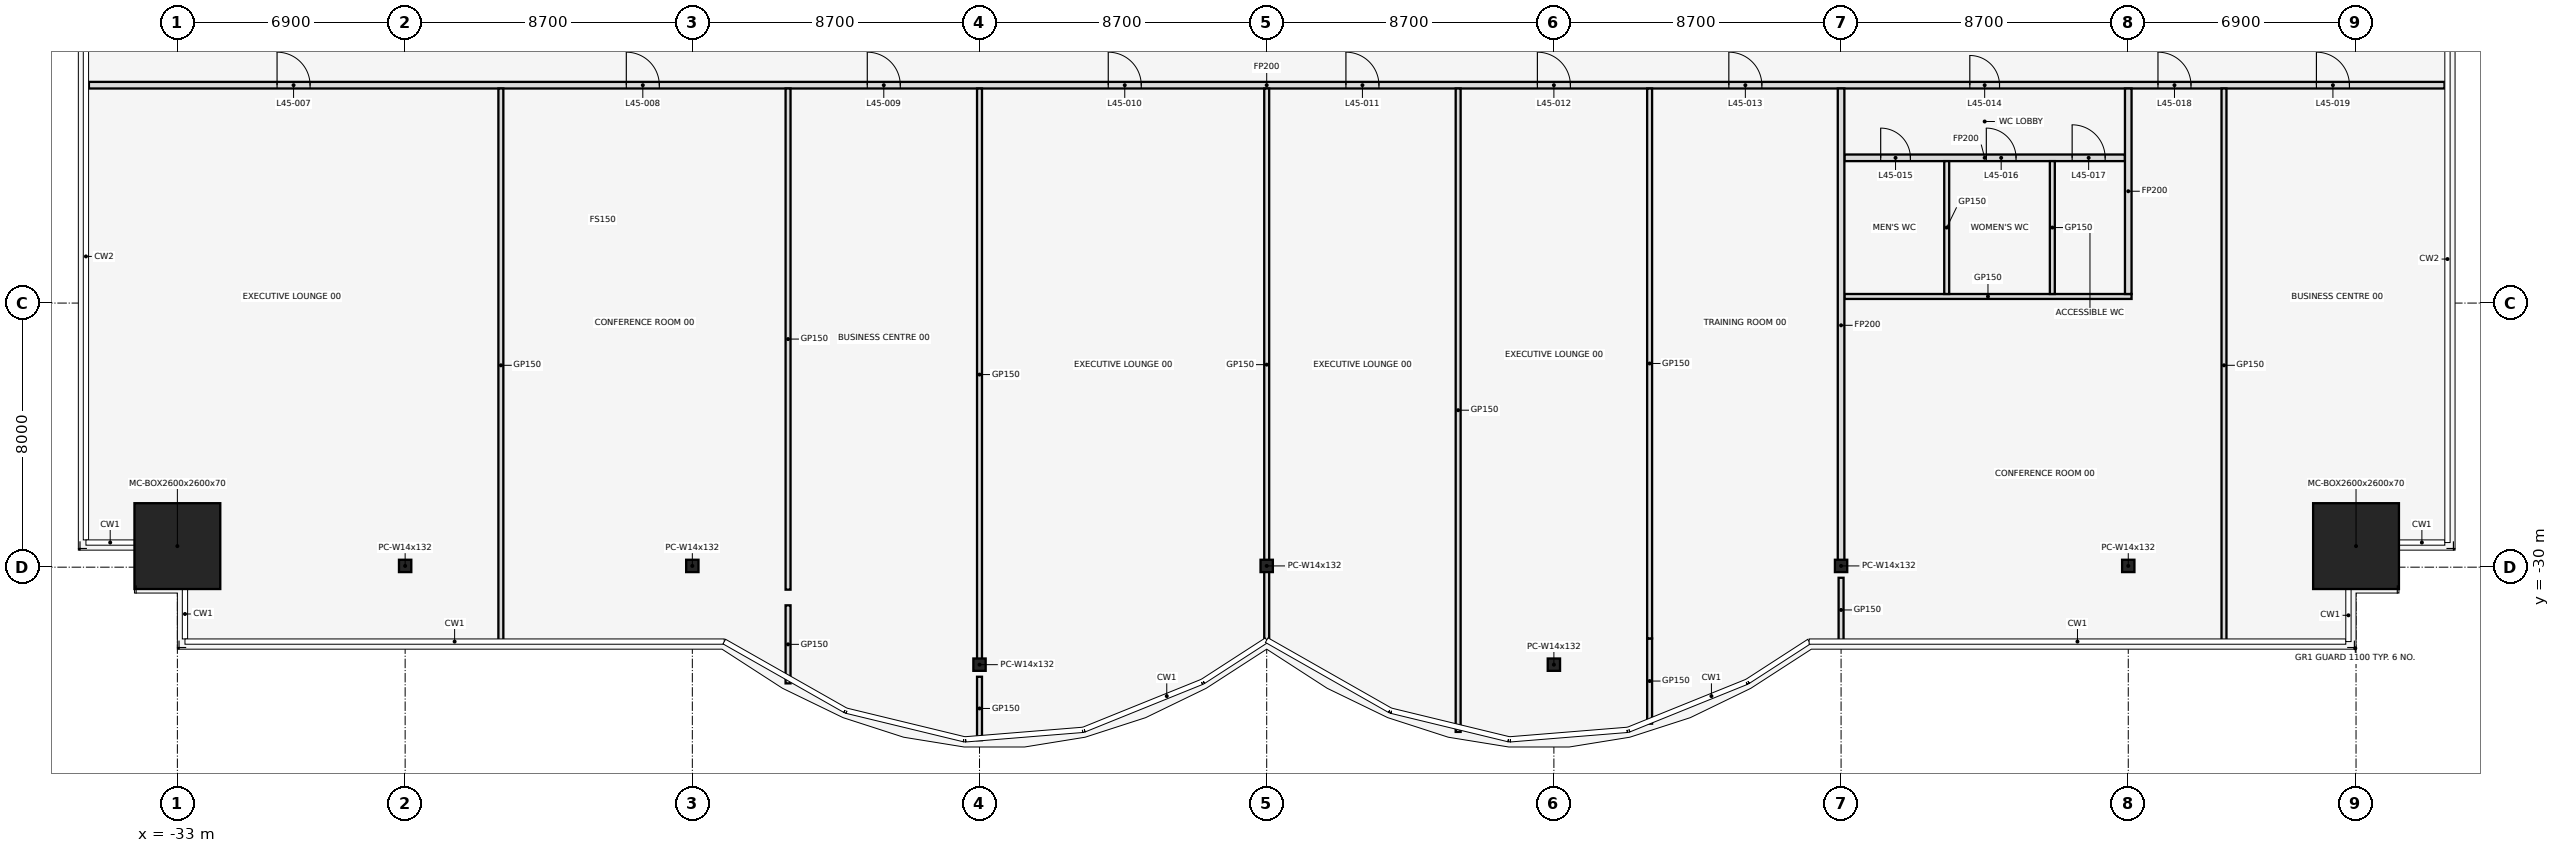
"""IFC4 building model, lengths in metres.
Left out: names, types, materials, properties, quantities, classifications, styles, units other than length and angle.
Written with IfcOpenShell. Run it as: python <this file> out.ifc"""

import sys

from ifc_helpers import new_model, si_unit, direction, frame, frame_2d, origin, origin_2d, place, context, subcontext, project, spatial, rectangle, hollow_rectangle, i_section, extrude, element, fill, save


model = new_model("IFC4")
c1 = context("Model", 3, precision=1e-05, world=origin(), true_north=direction((0.0, 1.0)))
c2 = subcontext(c1, "Body", "Model", "MODEL_VIEW")
j1 = project(units=[si_unit("LENGTHUNIT", "METRE"), si_unit("PLANEANGLEUNIT", "RADIAN")], contexts=[c1])
p1 = place(None, origin())
s1 = spatial("IfcSite", under=j1, at=p1, CompositionType="ELEMENT")
p2 = place(p1, origin())
s2 = spatial("IfcBuilding", under=s1, at=p2, CompositionType="ELEMENT")
p3 = place(p2, frame((0.0, 0.0, 203.2)))
s3 = spatial("IfcBuildingStorey", under=s2, at=p3, CompositionType="ELEMENT", Elevation=203.2)
p4 = place(p3, frame((-33.0, -29.362, 0.0), z_axis=(0.0, 0.0, 1.0), x_axis=(1.0, 0.0, 0.0)))
e1 = element("IfcColumn", 1, at=p4, inside=s3, PredefinedType="COLUMN", context=c2, shape_type="SweptSolid", body=[
    extrude(hollow_rectangle(XDim=2.6, YDim=2.6, WallThickness=0.07, at=origin_2d()), origin(), (0.0, 0.0, 1.0), 4.1),
])
for number, where, z_axis, x_axis in (
    (2, (-26.1, -29.962, 0.0), (0.0, 0.0, 1.0), (1.0, 0.0, 0.0)),
    (3, (-17.4, -29.962, 0.0), (0.0, 0.0, 1.0), (1.0, 0.0, 0.0)),
    (4, (-8.7, -32.953, 0.0), (0.0, 0.0, 1.0), (1.0, 0.0, 0.0)),
    (5, (0.0, -29.962, 0.0), (0.0, 0.0, 1.0), (1.0, 0.0, 0.0)),
    (6, (8.7, -32.953, 0.0), (0.0, 0.0, 1.0), (1.0, 0.0, 0.0)),
    (7, (17.4, -29.962, 0.0), (0.0, 0.0, 1.0), (1.0, 0.0, 0.0)),
    (8, (26.1, -29.962, 0.0), (0.0, 0.0, 1.0), (1.0, 0.0, 0.0)),
):
    element("IfcColumn", number, at=place(p3, frame(where, z_axis=z_axis, x_axis=x_axis)), inside=s3, PredefinedType="COLUMN", context=c2, shape_type="SweptSolid", body=[
        extrude(i_section(OverallWidth=0.373, OverallDepth=0.373, WebThickness=0.016, FlangeThickness=0.026, at=origin_2d()), origin(), (0.0, 0.0, 1.0), 4.1),
    ])
p5 = place(p3, frame((33.0, -29.362, 0.0), z_axis=(0.0, 0.0, 1.0), x_axis=(1.0, 0.0, 0.0)))
e9 = element("IfcColumn", 9, at=p5, inside=s3, PredefinedType="COLUMN", context=c2, shape_type="SweptSolid", body=[
    extrude(hollow_rectangle(XDim=2.6, YDim=2.6, WallThickness=0.07, at=origin_2d()), origin(), (0.0, 0.0, 1.0), 4.1),
])
p6 = place(p3, frame((17.5, -21.8, 0.0), z_axis=(0.0, 0.0, 1.0), x_axis=(1.0, 0.0, 0.0)))
e10 = element("IfcWall", 10, at=p6, inside=s3, PredefinedType="PARTITIONING", context=c2, shape_type="SweptSolid", body=[
    extrude(rectangle(XDim=8.7, YDim=0.15, at=frame_2d((4.35, 0.0))), origin(), (0.0, 0.0, 1.0), 2.84),
])
p7 = place(p3, frame((17.5, -17.6, 0.0), z_axis=(0.0, 0.0, 1.0), x_axis=(1.0, 0.0, 0.0)))
e11 = element("IfcWall", 11, at=p7, inside=s3, PredefinedType="PARTITIONING", context=c2, shape_type="SweptSolid", body=[
    extrude(rectangle(XDim=8.5, YDim=0.2, at=frame_2d((4.25, 0.0))), origin(), (0.0, 0.0, 1.0), 2.84),
])
p8 = place(p7, frame((1.1, 0.0, 0.0)))
e12 = element("IfcOpeningElement", 12, at=p8, cuts=e11, PredefinedType="OPENING", context=c2, shape_type="SweptSolid", body=[
    extrude(rectangle(XDim=0.9, YDim=2.1, at=frame_2d((0.45, 1.05))), frame((0.0, 0.112, 0.0), z_axis=(0.0, -1.0, 0.0), x_axis=(1.0, 0.0, 0.0)), (0.0, 0.0, 1.0), 0.224),
])
p9 = place(p7, frame((4.3, 0.0, 0.0)))
e13 = element("IfcOpeningElement", 13, at=p9, cuts=e11, PredefinedType="OPENING", context=c2, shape_type="SweptSolid", body=[
    extrude(rectangle(XDim=0.9, YDim=2.1, at=frame_2d((0.45, 1.05))), frame((0.0, 0.112, 0.0), z_axis=(0.0, -1.0, 0.0), x_axis=(1.0, 0.0, 0.0)), (0.0, 0.0, 1.0), 0.224),
])
p10 = place(p7, frame((6.9, 0.0, 0.0)))
e14 = element("IfcOpeningElement", 14, at=p10, cuts=e11, PredefinedType="OPENING", context=c2, shape_type="SweptSolid", body=[
    extrude(rectangle(XDim=1.0, YDim=2.1, at=frame_2d((0.5, 1.05))), frame((0.0, 0.112, 0.0), z_axis=(0.0, -1.0, 0.0), x_axis=(1.0, 0.0, 0.0)), (0.0, 0.0, 1.0), 0.224),
])
p11 = place(p3, frame((-35.68, -15.4, 0.0), z_axis=(0.0, 0.0, 1.0), x_axis=(1.0, 0.0, 0.0)))
e15 = element("IfcWall", 15, at=p11, inside=s3, PredefinedType="PARTITIONING", context=c2, shape_type="SweptSolid", body=[
    extrude(rectangle(XDim=71.36, YDim=0.2, at=frame_2d((35.68, 0.0))), origin(), (0.0, 0.0, 1.0), 2.84),
])
p12 = place(p11, frame((5.7, 0.0, 0.0)))
e16 = element("IfcOpeningElement", 16, at=p12, cuts=e15, PredefinedType="OPENING", context=c2, shape_type="SweptSolid", body=[
    extrude(rectangle(XDim=1.0, YDim=2.1, at=frame_2d((0.5, 1.05))), frame((0.0, 0.112, 0.0), z_axis=(0.0, -1.0, 0.0), x_axis=(1.0, 0.0, 0.0)), (0.0, 0.0, 1.0), 0.224),
])
p13 = place(p11, frame((16.28, 0.0, 0.0)))
e17 = element("IfcOpeningElement", 17, at=p13, cuts=e15, PredefinedType="OPENING", context=c2, shape_type="SweptSolid", body=[
    extrude(rectangle(XDim=1.0, YDim=2.1, at=frame_2d((0.5, 1.05))), frame((0.0, 0.112, 0.0), z_axis=(0.0, -1.0, 0.0), x_axis=(1.0, 0.0, 0.0)), (0.0, 0.0, 1.0), 0.224),
])
p14 = place(p11, frame((23.58, 0.0, 0.0)))
e18 = element("IfcOpeningElement", 18, at=p14, cuts=e15, PredefinedType="OPENING", context=c2, shape_type="SweptSolid", body=[
    extrude(rectangle(XDim=1.0, YDim=2.1, at=frame_2d((0.5, 1.05))), frame((0.0, 0.112, 0.0), z_axis=(0.0, -1.0, 0.0), x_axis=(1.0, 0.0, 0.0)), (0.0, 0.0, 1.0), 0.224),
])
p15 = place(p11, frame((30.88, 0.0, 0.0)))
e19 = element("IfcOpeningElement", 19, at=p15, cuts=e15, PredefinedType="OPENING", context=c2, shape_type="SweptSolid", body=[
    extrude(rectangle(XDim=1.0, YDim=2.1, at=frame_2d((0.5, 1.05))), frame((0.0, 0.112, 0.0), z_axis=(0.0, -1.0, 0.0), x_axis=(1.0, 0.0, 0.0)), (0.0, 0.0, 1.0), 0.224),
])
p16 = place(p11, frame((38.08, 0.0, 0.0)))
e20 = element("IfcOpeningElement", 20, at=p16, cuts=e15, PredefinedType="OPENING", context=c2, shape_type="SweptSolid", body=[
    extrude(rectangle(XDim=1.0, YDim=2.1, at=frame_2d((0.5, 1.05))), frame((0.0, 0.112, 0.0), z_axis=(0.0, -1.0, 0.0), x_axis=(1.0, 0.0, 0.0)), (0.0, 0.0, 1.0), 0.224),
])
p17 = place(p11, frame((43.88, 0.0, 0.0)))
e21 = element("IfcOpeningElement", 21, at=p17, cuts=e15, PredefinedType="OPENING", context=c2, shape_type="SweptSolid", body=[
    extrude(rectangle(XDim=1.0, YDim=2.1, at=frame_2d((0.5, 1.05))), frame((0.0, 0.112, 0.0), z_axis=(0.0, -1.0, 0.0), x_axis=(1.0, 0.0, 0.0)), (0.0, 0.0, 1.0), 0.224),
])
p18 = place(p11, frame((49.68, 0.0, 0.0)))
e22 = element("IfcOpeningElement", 22, at=p18, cuts=e15, PredefinedType="OPENING", context=c2, shape_type="SweptSolid", body=[
    extrude(rectangle(XDim=1.0, YDim=2.1, at=frame_2d((0.5, 1.05))), frame((0.0, 0.112, 0.0), z_axis=(0.0, -1.0, 0.0), x_axis=(1.0, 0.0, 0.0)), (0.0, 0.0, 1.0), 0.224),
])
p19 = place(p11, frame((56.98, 0.0, 0.0)))
e23 = element("IfcOpeningElement", 23, at=p19, cuts=e15, PredefinedType="OPENING", context=c2, shape_type="SweptSolid", body=[
    extrude(rectangle(XDim=0.9, YDim=2.1, at=frame_2d((0.45, 1.05))), frame((0.0, 0.112, 0.0), z_axis=(0.0, -1.0, 0.0), x_axis=(1.0, 0.0, 0.0)), (0.0, 0.0, 1.0), 0.224),
])
p20 = place(p11, frame((62.68, 0.0, 0.0)))
e24 = element("IfcOpeningElement", 24, at=p20, cuts=e15, PredefinedType="OPENING", context=c2, shape_type="SweptSolid", body=[
    extrude(rectangle(XDim=1.0, YDim=2.1, at=frame_2d((0.5, 1.05))), frame((0.0, 0.112, 0.0), z_axis=(0.0, -1.0, 0.0), x_axis=(1.0, 0.0, 0.0)), (0.0, 0.0, 1.0), 0.224),
])
p21 = place(p11, frame((67.48, 0.0, 0.0)))
e25 = element("IfcOpeningElement", 25, at=p21, cuts=e15, PredefinedType="OPENING", context=c2, shape_type="SweptSolid", body=[
    extrude(rectangle(XDim=1.0, YDim=2.1, at=frame_2d((0.5, 1.05))), frame((0.0, 0.112, 0.0), z_axis=(0.0, -1.0, 0.0), x_axis=(1.0, 0.0, 0.0)), (0.0, 0.0, 1.0), 0.224),
])
p22 = place(p3, frame((-23.2, -32.27, 0.0), z_axis=(0.0, 0.0, 1.0), x_axis=(0.0, 1.0, 0.0)))
e26 = element("IfcWall", 26, at=p22, inside=s3, PredefinedType="PARTITIONING", context=c2, shape_type="SweptSolid", body=[
    extrude(rectangle(XDim=16.77, YDim=0.15, at=frame_2d((8.385, 0.0))), origin(), (0.0, 0.0, 1.0), 2.84),
])
p23 = place(p3, frame((-14.5, -33.52, 0.0), z_axis=(0.0, 0.0, 1.0), x_axis=(0.0, 1.0, 0.0)))
e27 = element("IfcWall", 27, at=p23, inside=s3, PredefinedType="PARTITIONING", context=c2, shape_type="SweptSolid", body=[
    extrude(rectangle(XDim=2.365, YDim=0.15, at=frame_2d((1.182, 0.0))), origin(), (0.0, 0.0, 1.0), 2.84),
])
p24 = place(p3, frame((-14.5, -30.681, 0.0), z_axis=(0.0, 0.0, 1.0), x_axis=(0.0, 1.0, 0.0)))
e28 = element("IfcWall", 28, at=p24, inside=s3, PredefinedType="PARTITIONING", context=c2, shape_type="SweptSolid", body=[
    extrude(rectangle(XDim=15.181, YDim=0.15, at=frame_2d((7.59, 0.0))), origin(), (0.0, 0.0, 1.0), 2.84),
])
p25 = place(p3, frame((-8.7, -35.24, 0.0), z_axis=(0.0, 0.0, 1.0), x_axis=(0.0, 1.0, 0.0)))
e29 = element("IfcWall", 29, at=p25, inside=s3, PredefinedType="PARTITIONING", context=c2, shape_type="SweptSolid", body=[
    extrude(rectangle(XDim=1.921, YDim=0.15, at=frame_2d((0.96, 0.0))), origin(), (0.0, 0.0, 1.0), 2.84),
])
p26 = place(p3, frame((-8.7, -32.831, 0.0), z_axis=(0.0, 0.0, 1.0), x_axis=(0.0, 1.0, 0.0)))
e30 = element("IfcWall", 30, at=p26, inside=s3, PredefinedType="PARTITIONING", context=c2, shape_type="SweptSolid", body=[
    extrude(rectangle(XDim=17.331, YDim=0.15, at=frame_2d((8.666, 0.0))), origin(), (0.0, 0.0, 1.0), 2.84),
])
p27 = place(p3, frame((0.0, -32.23, 0.0), z_axis=(0.0, 0.0, 1.0), x_axis=(0.0, 1.0, 0.0)))
e31 = element("IfcWall", 31, at=p27, inside=s3, PredefinedType="PARTITIONING", context=c2, shape_type="SweptSolid", body=[
    extrude(rectangle(XDim=16.73, YDim=0.15, at=frame_2d((8.365, 0.0))), origin(), (0.0, 0.0, 1.0), 2.84),
])
p28 = place(p3, frame((5.8, -34.99, 0.0), z_axis=(0.0, 0.0, 1.0), x_axis=(0.0, 1.0, 0.0)))
e32 = element("IfcWall", 32, at=p28, inside=s3, PredefinedType="PARTITIONING", context=c2, shape_type="SweptSolid", body=[
    extrude(rectangle(XDim=19.49, YDim=0.15, at=frame_2d((9.745, 0.0))), origin(), (0.0, 0.0, 1.0), 2.84),
])
p29 = place(p3, frame((11.6, -34.74, 0.0), z_axis=(0.0, 0.0, 1.0), x_axis=(0.0, 1.0, 0.0)))
e33 = element("IfcWall", 33, at=p29, inside=s3, PredefinedType="PARTITIONING", context=c2, shape_type="SweptSolid", body=[
    extrude(rectangle(XDim=2.581, YDim=0.15, at=frame_2d((1.291, 0.0))), origin(), (0.0, 0.0, 1.0), 2.84),
])
p30 = place(p3, frame((11.6, -32.159, 0.0), z_axis=(0.0, 0.0, 1.0), x_axis=(0.0, 1.0, 0.0)))
e34 = element("IfcWall", 34, at=p30, inside=s3, PredefinedType="PARTITIONING", context=c2, shape_type="SweptSolid", body=[
    extrude(rectangle(XDim=16.659, YDim=0.15, at=frame_2d((8.33, 0.0))), origin(), (0.0, 0.0, 1.0), 2.84),
])
p31 = place(p3, frame((17.4, -32.27, 0.0), z_axis=(0.0, 0.0, 1.0), x_axis=(0.0, 1.0, 0.0)))
e35 = element("IfcWall", 35, at=p31, inside=s3, PredefinedType="PARTITIONING", context=c2, shape_type="SweptSolid", body=[
    extrude(rectangle(XDim=1.949, YDim=0.15, at=frame_2d((0.974, 0.0))), origin(), (0.0, 0.0, 1.0), 2.84),
])
p32 = place(p3, frame((17.4, -29.847, 0.0), z_axis=(0.0, 0.0, 1.0), x_axis=(0.0, 1.0, 0.0)))
e36 = element("IfcWall", 36, at=p32, inside=s3, PredefinedType="PARTITIONING", context=c2, shape_type="SweptSolid", body=[
    extrude(rectangle(XDim=14.347, YDim=0.2, at=frame_2d((7.173, 0.0))), origin(), (0.0, 0.0, 1.0), 2.84),
])
for number, where, z_axis, x_axis in (
    (37, (20.6, -21.725, 0.0), (0.0, 0.0, 1.0), (0.0, 1.0, 0.0)),
    (38, (23.8, -21.725, 0.0), (0.0, 0.0, 1.0), (0.0, 1.0, 0.0)),
):
    element("IfcWall", number, at=place(p3, frame(where, z_axis=z_axis, x_axis=x_axis)), inside=s3, PredefinedType="PARTITIONING", context=c2, shape_type="SweptSolid", body=[
        extrude(rectangle(XDim=4.025, YDim=0.15, at=frame_2d((2.013, 0.0))), origin(), (0.0, 0.0, 1.0), 2.84),
    ])
p33 = place(p3, frame((26.1, -21.725, 0.0), z_axis=(0.0, 0.0, 1.0), x_axis=(0.0, 1.0, 0.0)))
e39 = element("IfcWall", 39, at=p33, inside=s3, PredefinedType="PARTITIONING", context=c2, shape_type="SweptSolid", body=[
    extrude(rectangle(XDim=6.225, YDim=0.2, at=frame_2d((3.113, 0.0))), origin(), (0.0, 0.0, 1.0), 2.84),
])
p34 = place(p3, frame((29.0, -32.27, 0.0), z_axis=(0.0, 0.0, 1.0), x_axis=(0.0, 1.0, 0.0)))
e40 = element("IfcWall", 40, at=p34, inside=s3, PredefinedType="PARTITIONING", context=c2, shape_type="SweptSolid", body=[
    extrude(rectangle(XDim=16.77, YDim=0.15, at=frame_2d((8.385, 0.0))), origin(), (0.0, 0.0, 1.0), 2.84),
])
p35 = place(p12, frame((1.0, 0.0, 0.0), z_axis=(0.0, 0.0, 1.0), x_axis=(-1.0, 0.0, 0.0)))
e41 = element("IfcDoor", 41, at=p35, inside=s3, OperationType="SINGLE_SWING_LEFT", PredefinedType="DOOR", context=c2, shape_type="SweptSolid", body=[
    extrude(rectangle(XDim=1.0, YDim=2.1, at=frame_2d((0.5, 1.05))), frame((0.0, 0.025, 0.0), z_axis=(0.0, -1.0, 0.0), x_axis=(1.0, 0.0, 0.0)), (0.0, 0.0, 1.0), 0.05),
])
fill(e16, e41)
p36 = place(p13, frame((1.0, 0.0, 0.0), z_axis=(0.0, 0.0, 1.0), x_axis=(-1.0, 0.0, 0.0)))
e42 = element("IfcDoor", 42, at=p36, inside=s3, OperationType="SINGLE_SWING_RIGHT", PredefinedType="DOOR", context=c2, shape_type="SweptSolid", body=[
    extrude(rectangle(XDim=1.0, YDim=2.1, at=frame_2d((0.5, 1.05))), frame((0.0, 0.025, 0.0), z_axis=(0.0, -1.0, 0.0), x_axis=(1.0, 0.0, 0.0)), (0.0, 0.0, 1.0), 0.05),
])
fill(e17, e42)
p37 = place(p14, frame((1.0, 0.0, 0.0), z_axis=(0.0, 0.0, 1.0), x_axis=(-1.0, 0.0, 0.0)))
e43 = element("IfcDoor", 43, at=p37, inside=s3, OperationType="SINGLE_SWING_RIGHT", PredefinedType="DOOR", context=c2, shape_type="SweptSolid", body=[
    extrude(rectangle(XDim=1.0, YDim=2.1, at=frame_2d((0.5, 1.05))), frame((0.0, 0.025, 0.0), z_axis=(0.0, -1.0, 0.0), x_axis=(1.0, 0.0, 0.0)), (0.0, 0.0, 1.0), 0.05),
])
fill(e18, e43)
p38 = place(p15, frame((1.0, 0.0, 0.0), z_axis=(0.0, 0.0, 1.0), x_axis=(-1.0, 0.0, 0.0)))
e44 = element("IfcDoor", 44, at=p38, inside=s3, OperationType="SINGLE_SWING_LEFT", PredefinedType="DOOR", context=c2, shape_type="SweptSolid", body=[
    extrude(rectangle(XDim=1.0, YDim=2.1, at=frame_2d((0.5, 1.05))), frame((0.0, 0.025, 0.0), z_axis=(0.0, -1.0, 0.0), x_axis=(1.0, 0.0, 0.0)), (0.0, 0.0, 1.0), 0.05),
])
fill(e19, e44)
p39 = place(p16, frame((1.0, 0.0, 0.0), z_axis=(0.0, 0.0, 1.0), x_axis=(-1.0, 0.0, 0.0)))
e45 = element("IfcDoor", 45, at=p39, inside=s3, OperationType="SINGLE_SWING_RIGHT", PredefinedType="DOOR", context=c2, shape_type="SweptSolid", body=[
    extrude(rectangle(XDim=1.0, YDim=2.1, at=frame_2d((0.5, 1.05))), frame((0.0, 0.025, 0.0), z_axis=(0.0, -1.0, 0.0), x_axis=(1.0, 0.0, 0.0)), (0.0, 0.0, 1.0), 0.05),
])
fill(e20, e45)
p40 = place(p17, frame((1.0, 0.0, 0.0), z_axis=(0.0, 0.0, 1.0), x_axis=(-1.0, 0.0, 0.0)))
e46 = element("IfcDoor", 46, at=p40, inside=s3, OperationType="SINGLE_SWING_RIGHT", PredefinedType="DOOR", context=c2, shape_type="SweptSolid", body=[
    extrude(rectangle(XDim=1.0, YDim=2.1, at=frame_2d((0.5, 1.05))), frame((0.0, 0.025, 0.0), z_axis=(0.0, -1.0, 0.0), x_axis=(1.0, 0.0, 0.0)), (0.0, 0.0, 1.0), 0.05),
])
fill(e21, e46)
p41 = place(p18, frame((1.0, 0.0, 0.0), z_axis=(0.0, 0.0, 1.0), x_axis=(-1.0, 0.0, 0.0)))
e47 = element("IfcDoor", 47, at=p41, inside=s3, OperationType="SINGLE_SWING_LEFT", PredefinedType="DOOR", context=c2, shape_type="SweptSolid", body=[
    extrude(rectangle(XDim=1.0, YDim=2.1, at=frame_2d((0.5, 1.05))), frame((0.0, 0.025, 0.0), z_axis=(0.0, -1.0, 0.0), x_axis=(1.0, 0.0, 0.0)), (0.0, 0.0, 1.0), 0.05),
])
fill(e22, e47)
p42 = place(p19, frame((0.9, 0.0, 0.0), z_axis=(0.0, 0.0, 1.0), x_axis=(-1.0, 0.0, 0.0)))
e48 = element("IfcDoor", 48, at=p42, inside=s3, OperationType="SINGLE_SWING_RIGHT", PredefinedType="DOOR", context=c2, shape_type="SweptSolid", body=[
    extrude(rectangle(XDim=0.9, YDim=2.1, at=frame_2d((0.45, 1.05))), frame((0.0, 0.025, 0.0), z_axis=(0.0, -1.0, 0.0), x_axis=(1.0, 0.0, 0.0)), (0.0, 0.0, 1.0), 0.05),
])
fill(e23, e48)
p43 = place(p8, frame((0.9, 0.0, 0.0), z_axis=(0.0, 0.0, 1.0), x_axis=(-1.0, 0.0, 0.0)))
e49 = element("IfcDoor", 49, at=p43, inside=s3, OperationType="SINGLE_SWING_RIGHT", PredefinedType="DOOR", context=c2, shape_type="SweptSolid", body=[
    extrude(rectangle(XDim=0.9, YDim=2.1, at=frame_2d((0.45, 1.05))), frame((0.0, 0.025, 0.0), z_axis=(0.0, -1.0, 0.0), x_axis=(1.0, 0.0, 0.0)), (0.0, 0.0, 1.0), 0.05),
])
fill(e12, e49)
p44 = place(p9, frame((0.9, 0.0, 0.0), z_axis=(0.0, 0.0, 1.0), x_axis=(-1.0, 0.0, 0.0)))
e50 = element("IfcDoor", 50, at=p44, inside=s3, OperationType="SINGLE_SWING_LEFT", PredefinedType="DOOR", context=c2, shape_type="SweptSolid", body=[
    extrude(rectangle(XDim=0.9, YDim=2.1, at=frame_2d((0.45, 1.05))), frame((0.0, 0.025, 0.0), z_axis=(0.0, -1.0, 0.0), x_axis=(1.0, 0.0, 0.0)), (0.0, 0.0, 1.0), 0.05),
])
fill(e13, e50)
p45 = place(p10, frame((1.0, 0.0, 0.0), z_axis=(0.0, 0.0, 1.0), x_axis=(-1.0, 0.0, 0.0)))
e51 = element("IfcDoor", 51, at=p45, inside=s3, OperationType="SINGLE_SWING_RIGHT", PredefinedType="DOOR", context=c2, shape_type="SweptSolid", body=[
    extrude(rectangle(XDim=1.0, YDim=2.1, at=frame_2d((0.5, 1.05))), frame((0.0, 0.025, 0.0), z_axis=(0.0, -1.0, 0.0), x_axis=(1.0, 0.0, 0.0)), (0.0, 0.0, 1.0), 0.05),
])
fill(e14, e51)
p46 = place(p20, frame((1.0, 0.0, 0.0), z_axis=(0.0, 0.0, 1.0), x_axis=(-1.0, 0.0, 0.0)))
e52 = element("IfcDoor", 52, at=p46, inside=s3, OperationType="SINGLE_SWING_RIGHT", PredefinedType="DOOR", context=c2, shape_type="SweptSolid", body=[
    extrude(rectangle(XDim=1.0, YDim=2.1, at=frame_2d((0.5, 1.05))), frame((0.0, 0.025, 0.0), z_axis=(0.0, -1.0, 0.0), x_axis=(1.0, 0.0, 0.0)), (0.0, 0.0, 1.0), 0.05),
])
fill(e24, e52)
p47 = place(p21, frame((1.0, 0.0, 0.0), z_axis=(0.0, 0.0, 1.0), x_axis=(-1.0, 0.0, 0.0)))
e53 = element("IfcDoor", 53, at=p47, inside=s3, OperationType="SINGLE_SWING_LEFT", PredefinedType="DOOR", context=c2, shape_type="SweptSolid", body=[
    extrude(rectangle(XDim=1.0, YDim=2.1, at=frame_2d((0.5, 1.05))), frame((0.0, 0.025, 0.0), z_axis=(0.0, -1.0, 0.0), x_axis=(1.0, 0.0, 0.0)), (0.0, 0.0, 1.0), 0.05),
])
fill(e25, e53)
save(model, sys.argv[1])
